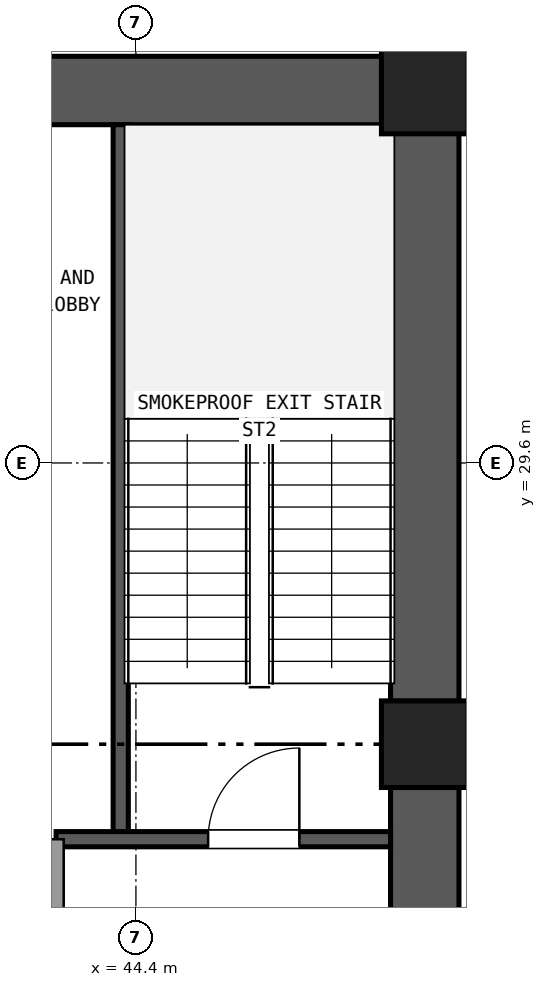
"""IFC4 building model, lengths in metres.
Left out: names, types, materials, properties, quantities, classifications, styles, units other than length and angle.
Written with IfcOpenShell. Run it as: python <this file> out.ifc"""

import sys

from ifc_helpers import new_model, si_unit, direction, frame, frame_2d, origin, origin_2d, place, context, subcontext, project, spatial, rectangle, extrude, element, fill, save


model = new_model("IFC4")
c1 = context("Model", 3, precision=1e-05, world=origin(), true_north=direction((0.0, 1.0)))
c2 = subcontext(c1, "Body", "Model", "MODEL_VIEW")
j1 = project(units=[si_unit("LENGTHUNIT", "METRE"), si_unit("PLANEANGLEUNIT", "RADIAN")], contexts=[c1])
p1 = place(None, origin())
s1 = spatial("IfcSite", under=j1, at=p1, CompositionType="ELEMENT")
p2 = place(p1, origin())
s2 = spatial("IfcBuilding", under=s1, at=p2, CompositionType="ELEMENT")
p3 = place(p2, frame((0.0, 0.0, -9.72)))
s3 = spatial("IfcBuildingStorey", under=s2, at=p3, CompositionType="ELEMENT", Elevation=-9.72)
for number, where, z_axis, x_axis in (
    (1, (48.2, 25.9, 0.0), (0.0, 0.0, 1.0), (1.0, 0.0, 0.0)),
    (2, (48.2, 34.5, 0.0), (0.0, 0.0, 1.0), (1.0, 0.0, 0.0)),
):
    element("IfcColumn", number, at=place(p3, frame(where, z_axis=z_axis, x_axis=x_axis)), inside=s3, PredefinedType="COLUMN", context=c2, shape_type="SweptSolid", body=[
        extrude(rectangle(XDim=1.14, YDim=1.14, at=origin_2d()), origin(), (0.0, 0.0, 1.0), 4.86),
    ])
for number, where, z_axis, x_axis in (
    (3, (48.2, 17.865, 0.0), (0.0, 0.0, 1.0), (0.0, 1.0, 0.0)),
    (4, (48.2, 26.465, 0.0), (0.0, 0.0, 1.0), (0.0, 1.0, 0.0)),
):
    element("IfcWall", number, at=place(p3, frame(where, z_axis=z_axis, x_axis=x_axis)), inside=s3, PredefinedType="SHEAR", context=c2, shape_type="SweptSolid", body=[
        extrude(rectangle(XDim=7.47, YDim=0.9, at=frame_2d((3.735, 0.0))), origin(), (0.0, 0.0, 1.0), 4.56),
    ])
p4 = place(p3, frame((47.635, 34.5, 0.0), z_axis=(0.0, 0.0, 1.0), x_axis=(-1.0, 0.0, 0.0)))
e5 = element("IfcWall", 5, at=p4, inside=s3, PredefinedType="SHEAR", context=c2, shape_type="SweptSolid", body=[
    extrude(rectangle(XDim=10.07, YDim=0.9, at=frame_2d((5.035, 0.0))), origin(), (0.0, 0.0, 1.0), 4.56),
])
p5 = place(p3, frame((44.2, 24.65, 0.0), z_axis=(0.0, 0.0, 1.0), x_axis=(0.0, 1.0, 0.0)))
e6 = element("IfcWall", 6, at=p5, inside=s3, PredefinedType="SHEAR", context=c2, shape_type="SweptSolid", body=[
    extrude(rectangle(XDim=9.4, YDim=0.2, at=frame_2d((4.7, 0.0))), origin(), (0.0, 0.0, 1.0), 4.56),
])
p6 = place(p3, frame((43.35, 24.65, 0.0), z_axis=(0.0, 0.0, 1.0), x_axis=(1.0, 0.0, 0.0)))
e7 = element("IfcWall", 7, at=p6, inside=s3, PredefinedType="SHEAR", context=c2, shape_type="SweptSolid", body=[
    extrude(rectangle(XDim=4.4, YDim=0.2, at=frame_2d((2.2, 0.0))), origin(), (0.0, 0.0, 1.0), 4.56),
])
p7 = place(p6, frame((2.0, 0.0, 0.0)))
e8 = element("IfcOpeningElement", 8, at=p7, cuts=e7, PredefinedType="OPENING", context=c2, shape_type="SweptSolid", body=[
    extrude(rectangle(XDim=1.2, YDim=2.15, at=frame_2d((0.6, 1.075))), frame((0.0, 0.11, 0.0), z_axis=(0.0, -1.0, 0.0), x_axis=(1.0, 0.0, 0.0)), (0.0, 0.0, 1.0), 0.22),
])
p8 = place(p3, frame((43.35, 17.75, 0.0), z_axis=(0.0, 0.0, 1.0), x_axis=(0.0, 1.0, 0.0)))
e9 = element("IfcWall", 9, at=p8, inside=s3, PredefinedType="SOLIDWALL", context=c2, shape_type="SweptSolid", body=[
    extrude(rectangle(XDim=6.9, YDim=0.2, at=frame_2d((3.45, 0.0))), origin(), (0.0, 0.0, 1.0), 3.85),
])
p9 = place(p8, frame((4.15, 0.0, 0.0)))
e10 = element("IfcOpeningElement", 10, at=p9, cuts=e9, PredefinedType="OPENING", context=c2, shape_type="SweptSolid", body=[
    extrude(rectangle(XDim=1.2, YDim=2.15, at=frame_2d((0.6, 1.075))), frame((0.0, 0.11, 0.0), z_axis=(0.0, -1.0, 0.0), x_axis=(1.0, 0.0, 0.0)), (0.0, 0.0, 1.0), 0.22),
])
p10 = place(p7, origin())
e11 = element("IfcDoor", 11, at=p10, inside=s3, OperationType="SINGLE_SWING_RIGHT", PredefinedType="DOOR", context=c2, shape_type="SweptSolid", body=[
    extrude(rectangle(XDim=1.2, YDim=2.15, at=frame_2d((0.6, 1.075))), frame((0.0, 0.025, 0.0), z_axis=(0.0, -1.0, 0.0), x_axis=(1.0, 0.0, 0.0)), (0.0, 0.0, 1.0), 0.05),
])
fill(e8, e11)
save(model, sys.argv[1])
